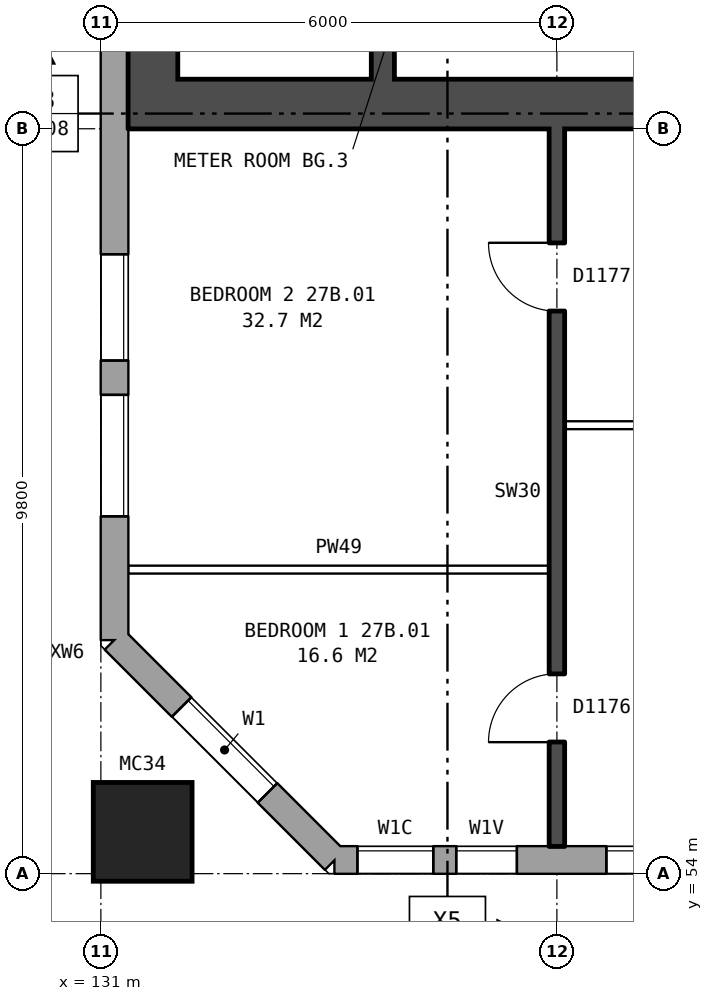
"""IFC4 building model, lengths in metres.
Left out: names, types, materials, properties, quantities, classifications, styles, units other than length and angle.
Written with IfcOpenShell. Run it as: python <this file> out.ifc"""

import sys

from ifc_helpers import new_model, si_unit, direction, frame, frame_2d, origin, origin_2d, place, context, subcontext, project, spatial, rectangle, hollow_rectangle, extrude, element, fill, save


model = new_model("IFC4")
c1 = context("Model", 3, precision=1e-05, world=origin(), true_north=direction((0.0, 1.0)))
c2 = subcontext(c1, "Body", "Model", "MODEL_VIEW")
j1 = project(units=[si_unit("LENGTHUNIT", "METRE"), si_unit("PLANEANGLEUNIT", "RADIAN")], contexts=[c1])
p1 = place(None, origin())
s1 = spatial("IfcSite", under=j1, at=p1, CompositionType="ELEMENT")
p2 = place(p1, origin())
s2 = spatial("IfcBuilding", under=s1, at=p2, CompositionType="ELEMENT")
p3 = place(p2, frame((0.0, 0.0, 99.5)))
s3 = spatial("IfcBuildingStorey", under=s2, at=p3, CompositionType="ELEMENT", Elevation=99.5)
p4 = place(p3, frame((131.55, 54.55, 0.0), z_axis=(0.0, 0.0, 1.0), x_axis=(1.0, 0.0, 0.0)))
e1 = element("IfcColumn", 1, at=p4, inside=s3, PredefinedType="COLUMN", context=c2, shape_type="SweptSolid", body=[
    extrude(hollow_rectangle(XDim=1.3, YDim=1.3, WallThickness=0.07, at=origin_2d()), origin(), (0.0, 0.0, 1.0), 3.1),
])
p5 = place(p3, frame((131.18, 57.075, 0.0), z_axis=(0.0, 0.0, 1.0), x_axis=(0.707106781187, -0.707106781187, 0.0)))
e2 = element("IfcWall", 2, at=p5, inside=s3, PredefinedType="STANDARD", context=c2, shape_type="SweptSolid", body=[
    extrude(rectangle(XDim=4.094, YDim=0.36, at=frame_2d((2.047, 0.0))), origin(), (0.0, 0.0, 1.0), 2.85),
])
p6 = place(p5, frame((1.247, 0.0, 0.8)))
e3 = element("IfcOpeningElement", 3, at=p6, cuts=e2, PredefinedType="OPENING", context=c2, shape_type="SweptSolid", body=[
    extrude(rectangle(XDim=1.6, YDim=1.8, at=frame_2d((0.8, 0.9))), frame((0.0, 0.19, 0.0), z_axis=(0.0, -1.0, 0.0), x_axis=(1.0, 0.0, 0.0)), (0.0, 0.0, 1.0), 0.38),
])
p7 = place(p3, frame((134.075, 54.18, 0.0), z_axis=(0.0, 0.0, 1.0), x_axis=(1.0, 0.0, 0.0)))
e4 = element("IfcWall", 4, at=p7, inside=s3, PredefinedType="STANDARD", context=c2, shape_type="SweptSolid", body=[
    extrude(rectangle(XDim=36.851, YDim=0.36, at=frame_2d((18.425, 0.0))), origin(), (0.0, 0.0, 1.0), 2.85),
])
p8 = place(p7, frame((0.3, 0.0, 0.8)))
e5 = element("IfcOpeningElement", 5, at=p8, cuts=e4, PredefinedType="OPENING", context=c2, shape_type="SweptSolid", body=[
    extrude(rectangle(XDim=1.0, YDim=1.8, at=frame_2d((0.5, 0.9))), frame((0.0, 0.19, 0.0), z_axis=(0.0, -1.0, 0.0), x_axis=(1.0, 0.0, 0.0)), (0.0, 0.0, 1.0), 0.38),
])
p9 = place(p7, frame((3.575, 0.0, 0.8)))
e6 = element("IfcOpeningElement", 6, at=p9, cuts=e4, PredefinedType="OPENING", context=c2, shape_type="SweptSolid", body=[
    extrude(rectangle(XDim=0.8, YDim=0.9, at=frame_2d((0.4, 0.45))), frame((0.0, 0.19, 0.0), z_axis=(0.0, -1.0, 0.0), x_axis=(1.0, 0.0, 0.0)), (0.0, 0.0, 1.0), 0.38),
])
p10 = place(p7, frame((6.625, 0.0, 0.8)))
e7 = element("IfcOpeningElement", 7, at=p10, cuts=e4, PredefinedType="OPENING", context=c2, shape_type="SweptSolid", body=[
    extrude(rectangle(XDim=1.6, YDim=1.8, at=frame_2d((0.8, 0.9))), frame((0.0, 0.19, 0.0), z_axis=(0.0, -1.0, 0.0), x_axis=(1.0, 0.0, 0.0)), (0.0, 0.0, 1.0), 0.38),
])
p11 = place(p7, frame((9.625, 0.0, 0.8)))
e8 = element("IfcOpeningElement", 8, at=p11, cuts=e4, PredefinedType="OPENING", context=c2, shape_type="SweptSolid", body=[
    extrude(rectangle(XDim=1.6, YDim=1.8, at=frame_2d((0.8, 0.9))), frame((0.0, 0.19, 0.0), z_axis=(0.0, -1.0, 0.0), x_axis=(1.0, 0.0, 0.0)), (0.0, 0.0, 1.0), 0.38),
])
p12 = place(p7, frame((12.625, 0.0, 0.8)))
e9 = element("IfcOpeningElement", 9, at=p12, cuts=e4, PredefinedType="OPENING", context=c2, shape_type="SweptSolid", body=[
    extrude(rectangle(XDim=1.6, YDim=1.8, at=frame_2d((0.8, 0.9))), frame((0.0, 0.19, 0.0), z_axis=(0.0, -1.0, 0.0), x_axis=(1.0, 0.0, 0.0)), (0.0, 0.0, 1.0), 0.38),
])
p13 = place(p7, frame((15.625, 0.0, 0.8)))
e10 = element("IfcOpeningElement", 10, at=p13, cuts=e4, PredefinedType="OPENING", context=c2, shape_type="SweptSolid", body=[
    extrude(rectangle(XDim=1.6, YDim=1.8, at=frame_2d((0.8, 0.9))), frame((0.0, 0.19, 0.0), z_axis=(0.0, -1.0, 0.0), x_axis=(1.0, 0.0, 0.0)), (0.0, 0.0, 1.0), 0.38),
])
p14 = place(p7, frame((18.625, 0.0, 0.8)))
e11 = element("IfcOpeningElement", 11, at=p14, cuts=e4, PredefinedType="OPENING", context=c2, shape_type="SweptSolid", body=[
    extrude(rectangle(XDim=1.6, YDim=1.8, at=frame_2d((0.8, 0.9))), frame((0.0, 0.19, 0.0), z_axis=(0.0, -1.0, 0.0), x_axis=(1.0, 0.0, 0.0)), (0.0, 0.0, 1.0), 0.38),
])
p15 = place(p7, frame((21.625, 0.0, 0.8)))
e12 = element("IfcOpeningElement", 12, at=p15, cuts=e4, PredefinedType="OPENING", context=c2, shape_type="SweptSolid", body=[
    extrude(rectangle(XDim=1.6, YDim=1.8, at=frame_2d((0.8, 0.9))), frame((0.0, 0.19, 0.0), z_axis=(0.0, -1.0, 0.0), x_axis=(1.0, 0.0, 0.0)), (0.0, 0.0, 1.0), 0.38),
])
p16 = place(p7, frame((24.625, 0.0, 0.8)))
e13 = element("IfcOpeningElement", 13, at=p16, cuts=e4, PredefinedType="OPENING", context=c2, shape_type="SweptSolid", body=[
    extrude(rectangle(XDim=1.6, YDim=1.8, at=frame_2d((0.8, 0.9))), frame((0.0, 0.19, 0.0), z_axis=(0.0, -1.0, 0.0), x_axis=(1.0, 0.0, 0.0)), (0.0, 0.0, 1.0), 0.38),
])
p17 = place(p7, frame((27.625, 0.0, 0.8)))
e14 = element("IfcOpeningElement", 14, at=p17, cuts=e4, PredefinedType="OPENING", context=c2, shape_type="SweptSolid", body=[
    extrude(rectangle(XDim=1.6, YDim=1.8, at=frame_2d((0.8, 0.9))), frame((0.0, 0.19, 0.0), z_axis=(0.0, -1.0, 0.0), x_axis=(1.0, 0.0, 0.0)), (0.0, 0.0, 1.0), 0.38),
])
p18 = place(p7, frame((30.625, 0.0, 0.8)))
e15 = element("IfcOpeningElement", 15, at=p18, cuts=e4, PredefinedType="OPENING", context=c2, shape_type="SweptSolid", body=[
    extrude(rectangle(XDim=1.6, YDim=1.8, at=frame_2d((0.8, 0.9))), frame((0.0, 0.19, 0.0), z_axis=(0.0, -1.0, 0.0), x_axis=(1.0, 0.0, 0.0)), (0.0, 0.0, 1.0), 0.38),
])
p19 = place(p7, frame((34.425, 0.0, 1.7)))
e16 = element("IfcOpeningElement", 16, at=p19, cuts=e4, PredefinedType="OPENING", context=c2, shape_type="SweptSolid", body=[
    extrude(rectangle(XDim=0.8, YDim=0.9, at=frame_2d((0.4, 0.45))), frame((0.0, 0.19, 0.0), z_axis=(0.0, -1.0, 0.0), x_axis=(1.0, 0.0, 0.0)), (0.0, 0.0, 1.0), 0.38),
])
p20 = place(p7, frame((1.6, 0.0, 1.7)))
e17 = element("IfcOpeningElement", 17, at=p20, cuts=e4, PredefinedType="OPENING", context=c2, shape_type="SweptSolid", body=[
    extrude(rectangle(XDim=0.8, YDim=0.9, at=frame_2d((0.4, 0.45))), frame((0.0, 0.19, 0.0), z_axis=(0.0, -1.0, 0.0), x_axis=(1.0, 0.0, 0.0)), (0.0, 0.0, 1.0), 0.38),
])
p21 = place(p7, frame((4.675, 0.0, 0.8)))
e18 = element("IfcOpeningElement", 18, at=p21, cuts=e4, PredefinedType="OPENING", context=c2, shape_type="SweptSolid", body=[
    extrude(rectangle(XDim=1.6, YDim=1.8, at=frame_2d((0.8, 0.9))), frame((0.0, 0.19, 0.0), z_axis=(0.0, -1.0, 0.0), x_axis=(1.0, 0.0, 0.0)), (0.0, 0.0, 1.0), 0.38),
])
p22 = place(p7, frame((35.525, 0.0, 0.8)))
e19 = element("IfcOpeningElement", 19, at=p22, cuts=e4, PredefinedType="OPENING", context=c2, shape_type="SweptSolid", body=[
    extrude(rectangle(XDim=1.0, YDim=1.8, at=frame_2d((0.5, 0.9))), frame((0.0, 0.19, 0.0), z_axis=(0.0, -1.0, 0.0), x_axis=(1.0, 0.0, 0.0)), (0.0, 0.0, 1.0), 0.38),
])
p23 = place(p3, frame((131.18, 82.925, 0.0), z_axis=(0.0, 0.0, 1.0), x_axis=(0.0, -1.0, 0.0)))
e20 = element("IfcWall", 20, at=p23, inside=s3, PredefinedType="STANDARD", context=c2, shape_type="SweptSolid", body=[
    extrude(rectangle(XDim=25.851, YDim=0.36, at=frame_2d((12.925, 0.0))), origin(), (0.0, 0.0, 1.0), 2.85),
])
p24 = place(p23, frame((1.625, 0.0, 0.8)))
e21 = element("IfcOpeningElement", 21, at=p24, cuts=e20, PredefinedType="OPENING", context=c2, shape_type="SweptSolid", body=[
    extrude(rectangle(XDim=1.6, YDim=1.8, at=frame_2d((0.8, 0.9))), frame((0.0, 0.19, 0.0), z_axis=(0.0, -1.0, 0.0), x_axis=(1.0, 0.0, 0.0)), (0.0, 0.0, 1.0), 0.38),
])
p25 = place(p23, frame((3.525, 0.0, 1.7)))
e22 = element("IfcOpeningElement", 22, at=p25, cuts=e20, PredefinedType="OPENING", context=c2, shape_type="SweptSolid", body=[
    extrude(rectangle(XDim=1.4, YDim=0.9, at=frame_2d((0.7, 0.45))), frame((0.0, 0.19, 0.0), z_axis=(0.0, -1.0, 0.0), x_axis=(1.0, 0.0, 0.0)), (0.0, 0.0, 1.0), 0.38),
])
p26 = place(p23, frame((20.775, 0.0, 1.7)))
e23 = element("IfcOpeningElement", 23, at=p26, cuts=e20, PredefinedType="OPENING", context=c2, shape_type="SweptSolid", body=[
    extrude(rectangle(XDim=1.4, YDim=0.9, at=frame_2d((0.7, 0.45))), frame((0.0, 0.19, 0.0), z_axis=(0.0, -1.0, 0.0), x_axis=(1.0, 0.0, 0.0)), (0.0, 0.0, 1.0), 0.38),
])
p27 = place(p23, frame((22.625, 0.0, 0.8)))
e24 = element("IfcOpeningElement", 24, at=p27, cuts=e20, PredefinedType="OPENING", context=c2, shape_type="SweptSolid", body=[
    extrude(rectangle(XDim=1.6, YDim=1.8, at=frame_2d((0.8, 0.9))), frame((0.0, 0.19, 0.0), z_axis=(0.0, -1.0, 0.0), x_axis=(1.0, 0.0, 0.0)), (0.0, 0.0, 1.0), 0.38),
])
p28 = place(p3, frame((131.685, 64.45, 0.0), z_axis=(0.0, 0.0, 1.0), x_axis=(0.0, 1.0, 0.0)))
e25 = element("IfcWall", 25, at=p28, inside=s3, PredefinedType="SHEAR", context=c2, shape_type="SweptSolid", body=[
    extrude(rectangle(XDim=11.1, YDim=0.65, at=frame_2d((5.55, 0.0))), origin(), (0.0, 0.0, 1.0), 2.85),
])
p29 = place(p3, frame((139.76, 64.125, 0.0), z_axis=(0.0, 0.0, 1.0), x_axis=(-1.0, 0.0, 0.0)))
e26 = element("IfcWall", 26, at=p29, inside=s3, PredefinedType="SHEAR", context=c2, shape_type="SweptSolid", body=[
    extrude(rectangle(XDim=8.4, YDim=0.65, at=frame_2d((4.2, 0.0))), origin(), (0.0, 0.0, 1.0), 2.85),
])
p30 = place(p3, frame((134.71, 64.45, 0.0), z_axis=(0.0, 0.0, 1.0), x_axis=(0.0, 1.0, 0.0)))
e27 = element("IfcWall", 27, at=p30, inside=s3, PredefinedType="SHEAR", context=c2, shape_type="SweptSolid", body=[
    extrude(rectangle(XDim=6.65, YDim=0.3, at=frame_2d((3.325, 0.0))), origin(), (0.0, 0.0, 1.0), 2.85),
])
p31 = place(p3, frame((131.36, 58.0, 0.0), z_axis=(0.0, 0.0, 1.0), x_axis=(1.0, 0.0, 0.0)))
e28 = element("IfcWall", 28, at=p31, inside=s3, PredefinedType="PARTITIONING", context=c2, shape_type="SweptSolid", body=[
    extrude(rectangle(XDim=5.54, YDim=0.1, at=frame_2d((2.77, 0.0))), origin(), (0.0, 0.0, 1.0), 2.85),
])
p32 = place(p3, frame((137.1, 59.9, 0.0), z_axis=(0.0, 0.0, 1.0), x_axis=(1.0, 0.0, 0.0)))
e29 = element("IfcWall", 29, at=p32, inside=s3, PredefinedType="PARTITIONING", context=c2, shape_type="SweptSolid", body=[
    extrude(rectangle(XDim=5.8, YDim=0.1, at=frame_2d((2.9, 0.0))), origin(), (0.0, 0.0, 1.0), 2.85),
])
p33 = place(p32, frame((1.3, 0.0, 0.0)))
e30 = element("IfcOpeningElement", 30, at=p33, cuts=e29, PredefinedType="OPENING", context=c2, shape_type="SweptSolid", body=[
    extrude(rectangle(XDim=0.9, YDim=2.1, at=frame_2d((0.45, 1.05))), frame((0.0, 0.06, 0.0), z_axis=(0.0, -1.0, 0.0), x_axis=(1.0, 0.0, 0.0)), (0.0, 0.0, 1.0), 0.12),
])
p34 = place(p32, frame((4.2, 0.0, 0.0)))
e31 = element("IfcOpeningElement", 31, at=p34, cuts=e29, PredefinedType="OPENING", context=c2, shape_type="SweptSolid", body=[
    extrude(rectangle(XDim=0.9, YDim=2.1, at=frame_2d((0.45, 1.05))), frame((0.0, 0.06, 0.0), z_axis=(0.0, -1.0, 0.0), x_axis=(1.0, 0.0, 0.0)), (0.0, 0.0, 1.0), 0.12),
])
p35 = place(p3, frame((137.0, 54.36, 0.0), z_axis=(0.0, 0.0, 1.0), x_axis=(0.0, 1.0, 0.0)))
e32 = element("IfcWall", 32, at=p35, inside=s3, PredefinedType="SOLIDWALL", context=c2, shape_type="SweptSolid", body=[
    extrude(rectangle(XDim=9.44, YDim=0.2, at=frame_2d((4.72, 0.0))), origin(), (0.0, 0.0, 1.0), 2.85),
])
p36 = place(p35, frame((1.37, 0.0, 0.0)))
e33 = element("IfcOpeningElement", 33, at=p36, cuts=e32, PredefinedType="OPENING", context=c2, shape_type="SweptSolid", body=[
    extrude(rectangle(XDim=0.9, YDim=2.1, at=frame_2d((0.45, 1.05))), frame((0.0, 0.11, 0.0), z_axis=(0.0, -1.0, 0.0), x_axis=(1.0, 0.0, 0.0)), (0.0, 0.0, 1.0), 0.22),
])
p37 = place(p35, frame((7.04, 0.0, 0.0)))
e34 = element("IfcOpeningElement", 34, at=p37, cuts=e32, PredefinedType="OPENING", context=c2, shape_type="SweptSolid", body=[
    extrude(rectangle(XDim=0.9, YDim=2.1, at=frame_2d((0.45, 1.05))), frame((0.0, 0.11, 0.0), z_axis=(0.0, -1.0, 0.0), x_axis=(1.0, 0.0, 0.0)), (0.0, 0.0, 1.0), 0.22),
])
p38 = place(p6, origin())
e35 = element("IfcWindow", 35, at=p38, inside=s3, PartitioningType="SINGLE_PANEL", PredefinedType="WINDOW", context=c2, shape_type="SweptSolid", body=[
    extrude(rectangle(XDim=1.6, YDim=1.8, at=frame_2d((0.8, 0.9))), frame((0.0, 0.15, 0.0), z_axis=(0.0, -1.0, 0.0), x_axis=(1.0, 0.0, 0.0)), (0.0, 0.0, 1.0), 0.06),
])
fill(e3, e35)
p39 = place(p8, origin())
e36 = element("IfcWindow", 36, at=p39, inside=s3, PartitioningType="SINGLE_PANEL", PredefinedType="WINDOW", context=c2, shape_type="SweptSolid", body=[
    extrude(rectangle(XDim=1.0, YDim=1.8, at=frame_2d((0.5, 0.9))), frame((0.0, 0.15, 0.0), z_axis=(0.0, -1.0, 0.0), x_axis=(1.0, 0.0, 0.0)), (0.0, 0.0, 1.0), 0.06),
])
fill(e5, e36)
p40 = place(p9, origin())
e37 = element("IfcWindow", 37, at=p40, inside=s3, PartitioningType="SINGLE_PANEL", PredefinedType="WINDOW", context=c2, shape_type="SweptSolid", body=[
    extrude(rectangle(XDim=0.8, YDim=0.9, at=frame_2d((0.4, 0.45))), frame((0.0, 0.15, 0.0), z_axis=(0.0, -1.0, 0.0), x_axis=(1.0, 0.0, 0.0)), (0.0, 0.0, 1.0), 0.06),
])
fill(e6, e37)
p41 = place(p26, origin())
e38 = element("IfcWindow", 38, at=p41, inside=s3, PartitioningType="SINGLE_PANEL", PredefinedType="WINDOW", context=c2, shape_type="SweptSolid", body=[
    extrude(rectangle(XDim=1.4, YDim=0.9, at=frame_2d((0.7, 0.45))), frame((0.0, 0.15, 0.0), z_axis=(0.0, -1.0, 0.0), x_axis=(1.0, 0.0, 0.0)), (0.0, 0.0, 1.0), 0.06),
])
fill(e23, e38)
p42 = place(p27, origin())
e39 = element("IfcWindow", 39, at=p42, inside=s3, PartitioningType="SINGLE_PANEL", PredefinedType="WINDOW", context=c2, shape_type="SweptSolid", body=[
    extrude(rectangle(XDim=1.6, YDim=1.8, at=frame_2d((0.8, 0.9))), frame((0.0, 0.15, 0.0), z_axis=(0.0, -1.0, 0.0), x_axis=(1.0, 0.0, 0.0)), (0.0, 0.0, 1.0), 0.06),
])
fill(e24, e39)
p43 = place(p36, origin())
e40 = element("IfcDoor", 40, at=p43, inside=s3, OperationType="SINGLE_SWING_LEFT", PredefinedType="DOOR", context=c2, shape_type="SweptSolid", body=[
    extrude(rectangle(XDim=0.9, YDim=2.1, at=frame_2d((0.45, 1.05))), frame((0.0, 0.025, 0.0), z_axis=(0.0, -1.0, 0.0), x_axis=(1.0, 0.0, 0.0)), (0.0, 0.0, 1.0), 0.05),
])
fill(e33, e40)
p44 = place(p37, origin())
e41 = element("IfcDoor", 41, at=p44, inside=s3, OperationType="SINGLE_SWING_RIGHT", PredefinedType="DOOR", context=c2, shape_type="SweptSolid", body=[
    extrude(rectangle(XDim=0.9, YDim=2.1, at=frame_2d((0.45, 1.05))), frame((0.0, 0.025, 0.0), z_axis=(0.0, -1.0, 0.0), x_axis=(1.0, 0.0, 0.0)), (0.0, 0.0, 1.0), 0.05),
])
fill(e34, e41)
p45 = place(p20, origin())
e42 = element("IfcWindow", 42, at=p45, inside=s3, PartitioningType="SINGLE_PANEL", PredefinedType="WINDOW", context=c2, shape_type="SweptSolid", body=[
    extrude(rectangle(XDim=0.8, YDim=0.9, at=frame_2d((0.4, 0.45))), frame((0.0, 0.15, 0.0), z_axis=(0.0, -1.0, 0.0), x_axis=(1.0, 0.0, 0.0)), (0.0, 0.0, 1.0), 0.06),
])
fill(e17, e42)
save(model, sys.argv[1])
